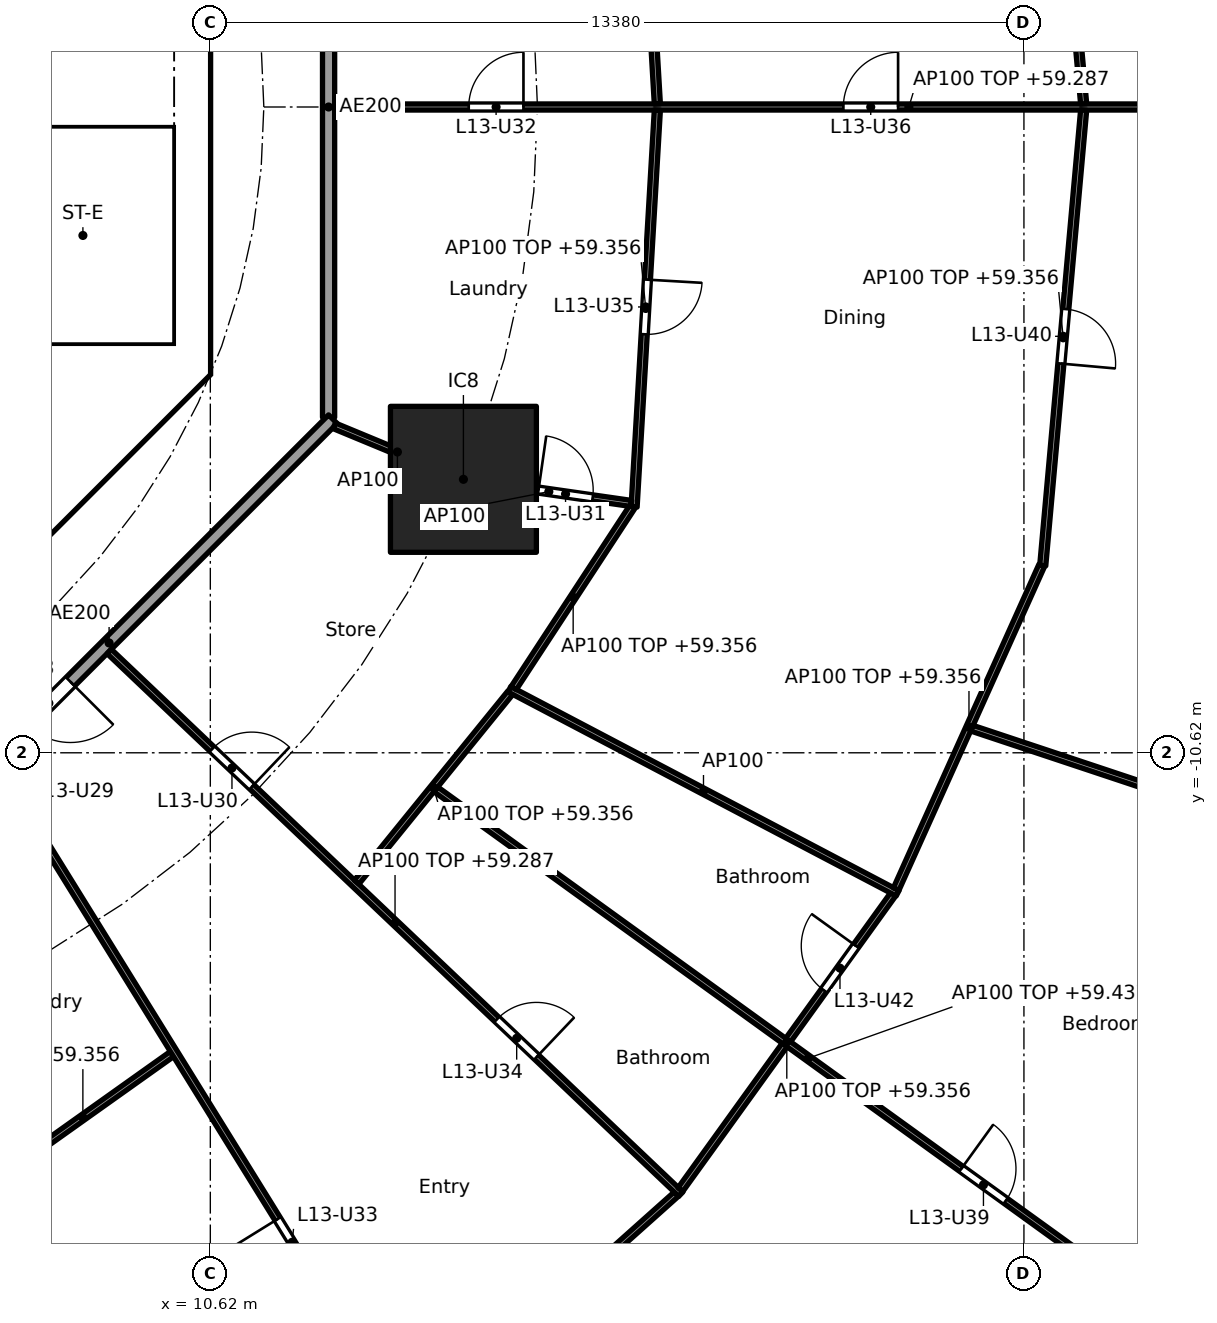
"""IFC4 building model, lengths in metres.
Left out: names, types, materials, properties, quantities, classifications, styles, units other than length and angle.
Written with IfcOpenShell. Run it as: python <this file> out.ifc"""

import sys

from ifc_helpers import new_model, si_unit, direction, frame, frame_2d, origin, origin_2d, place, context, subcontext, project, spatial, polyline, rectangle, outline, extrude, element, fill, save


model = new_model("IFC4")
c1 = context("Model", 3, precision=1e-05, world=origin(), true_north=direction((0.0, 1.0)))
c2 = subcontext(c1, "Body", "Model", "MODEL_VIEW")
j1 = project(units=[si_unit("LENGTHUNIT", "METRE"), si_unit("PLANEANGLEUNIT", "RADIAN")], contexts=[c1])
p1 = place(None, origin())
s1 = spatial("IfcSite", under=j1, at=p1, CompositionType="ELEMENT")
p2 = place(p1, origin())
s2 = spatial("IfcBuilding", under=s1, at=p2, CompositionType="ELEMENT")
p3 = place(p2, frame((0.0, 0.0, 56.6)))
s3 = spatial("IfcBuildingStorey", under=s2, at=p3, CompositionType="ELEMENT", Elevation=56.6)
p4 = place(p3, frame((14.782, -6.123, 0.0), z_axis=(0.0, 0.0, 1.0), x_axis=(1.0, 0.0, 0.0)))
e1 = element("IfcColumn", 1, at=p4, inside=s3, PredefinedType="COLUMN", context=c2, shape_type="SweptSolid", body=[
    extrude(rectangle(XDim=2.4, YDim=2.4, at=origin_2d()), origin(), (0.0, 0.0, 1.0), 3.7),
])
p5 = place(p3, frame((4.613, -9.988, 0.0), z_axis=(0.0, 0.0, 1.0), x_axis=(0.707106781187, 0.707106781187, 0.0)))
e2 = element("IfcWall", 2, at=p5, inside=s3, PredefinedType="SHEAR", context=c2, shape_type="SweptSolid", body=[
    extrude(rectangle(XDim=7.602, YDim=0.6, at=frame_2d((3.801, 0.0))), origin(), (0.0, 0.0, 1.0), 3.44),
])
p6 = place(p5, frame((3.201, 0.0, 0.0)))
e3 = element("IfcOpeningElement", 3, at=p6, cuts=e2, PredefinedType="OPENING", context=c2, shape_type="SweptSolid", body=[
    extrude(rectangle(XDim=1.2, YDim=2.1, at=frame_2d((0.6, 1.05))), frame((0.0, 0.31, 0.0), z_axis=(0.0, -1.0, 0.0), x_axis=(1.0, 0.0, 0.0)), (0.0, 0.0, 1.0), 0.62),
])
p7 = place(p3, origin())
e4 = element("IfcWall", 4, at=p7, inside=s3, PredefinedType="SHEAR", context=c2, shape_type="SweptSolid", body=[
    extrude(outline(polyline([(9.776, -4.401), (10.025, -4.152), (10.025, -3.801), (10.025, 4.152), (9.776, 4.401), (10.2, 4.825), (10.625, 4.401), (10.625, -4.401), (10.2, -4.825), (9.776, -4.401)])), origin(), (0.0, 0.0, 1.0), 3.44),
])
p8 = place(p3, origin())
e5 = element("IfcWall", 5, at=p8, inside=s3, PredefinedType="SOLIDWALL", context=c2, shape_type="SweptSolid", body=[
    extrude(outline(polyline([(10.025, -4.1), (6.7, -4.1), (6.7, -3.9), (10.025, -3.9), (10.025, -4.1)])), origin(), (0.0, 0.0, 1.0), 3.44),
])
p9 = place(p3, frame((6.137, -14.83, 0.0), z_axis=(0.0, 0.0, 1.0), x_axis=(0.27985745069, -0.960041565399, 0.0)))
e6 = element("IfcWall", 6, at=p9, inside=s3, PredefinedType="PARTITIONING", context=c2, shape_type="SweptSolid", body=[
    extrude(rectangle(XDim=16.705, YDim=0.2, at=frame_2d((8.353, 0.0))), origin(), (0.0, 0.0, 1.0), 2.756),
])
p10 = place(p3, frame((12.565, -5.104, 0.0), z_axis=(0.0, 0.0, 1.0), x_axis=(0.0, 1.0, 0.0)))
e7 = element("IfcWall", 7, at=p10, inside=s3, PredefinedType="PARTITIONING", context=c2, shape_type="SweptSolid", body=[
    extrude(rectangle(XDim=10.209, YDim=0.2, at=frame_2d((5.104, 0.0))), origin(), (0.0, 0.0, 1.0), 3.44),
])
p11 = place(p3, frame((5.275, -12.494, 0.0), z_axis=(0.0, 0.0, 1.0), x_axis=(0.707106781187, 0.707106781187, 0.0)))
e8 = element("IfcWall", 8, at=p11, inside=s3, PredefinedType="PARTITIONING", context=c2, shape_type="SweptSolid", body=[
    extrude(rectangle(XDim=10.409, YDim=0.2, at=frame_2d((5.205, 0.0))), origin(), (0.0, 0.0, 1.0), 3.44),
])
p12 = place(p11, frame((3.303, 0.0, 0.0)))
e9 = element("IfcOpeningElement", 9, at=p12, cuts=e8, PredefinedType="OPENING", context=c2, shape_type="SweptSolid", body=[
    extrude(rectangle(XDim=1.0, YDim=2.1, at=frame_2d((0.5, 1.05))), frame((0.0, 0.11, 0.0), z_axis=(0.0, -1.0, 0.0), x_axis=(1.0, 0.0, 0.0)), (0.0, 0.0, 1.0), 0.22),
])
p13 = place(p3, frame((12.665, 0.0, 0.0), z_axis=(0.0, 0.0, 1.0), x_axis=(1.0, 0.0, 0.0)))
e10 = element("IfcWall", 10, at=p13, inside=s3, PredefinedType="PARTITIONING", context=c2, shape_type="SweptSolid", body=[
    extrude(rectangle(XDim=18.885, YDim=0.1, at=frame_2d((9.443, 0.0))), origin(), (0.0, 0.0, 1.0), 2.687),
])
p14 = place(p13, frame((2.205, 0.0, 0.0)))
e11 = element("IfcOpeningElement", 11, at=p14, cuts=e10, PredefinedType="OPENING", context=c2, shape_type="SweptSolid", body=[
    extrude(rectangle(XDim=0.9, YDim=2.1, at=frame_2d((0.45, 1.05))), frame((0.0, 0.06, 0.0), z_axis=(0.0, -1.0, 0.0), x_axis=(1.0, 0.0, 0.0)), (0.0, 0.0, 1.0), 0.12),
])
p15 = place(p13, frame((8.366, 0.0, 0.0)))
e12 = element("IfcOpeningElement", 12, at=p15, cuts=e10, PredefinedType="OPENING", context=c2, shape_type="SweptSolid", body=[
    extrude(rectangle(XDim=0.9, YDim=2.1, at=frame_2d((0.45, 1.05))), frame((0.0, 0.06, 0.0), z_axis=(0.0, -1.0, 0.0), x_axis=(1.0, 0.0, 0.0)), (0.0, 0.0, 1.0), 0.12),
])
p16 = place(p13, frame((15.154, 0.0, 0.0)))
e13 = element("IfcOpeningElement", 13, at=p16, cuts=e10, PredefinedType="OPENING", context=c2, shape_type="SweptSolid", body=[
    extrude(rectangle(XDim=0.9, YDim=2.1, at=frame_2d((0.45, 1.05))), frame((0.0, 0.06, 0.0), z_axis=(0.0, -1.0, 0.0), x_axis=(1.0, 0.0, 0.0)), (0.0, 0.0, 1.0), 0.12),
])
p17 = place(p3, frame((17.971, 0.05, 0.0), z_axis=(0.0, 0.0, 1.0), x_axis=(-0.058513659907, 0.998286607946, 0.0)))
e14 = element("IfcWall", 14, at=p17, inside=s3, PredefinedType="PARTITIONING", context=c2, shape_type="SweptSolid", body=[
    extrude(rectangle(XDim=6.388, YDim=0.1, at=frame_2d((3.194, 0.0))), origin(), (0.0, 0.0, 1.0), 2.756),
])
p18 = place(p3, frame((17.971, -0.05, 0.0), z_axis=(0.0, 0.0, 1.0), x_axis=(-0.058476853647, -0.998288764631, 0.0)))
e15 = element("IfcWall", 15, at=p18, inside=s3, PredefinedType="PARTITIONING", context=c2, shape_type="SweptSolid", body=[
    extrude(rectangle(XDim=6.538, YDim=0.1, at=frame_2d((3.269, 0.0))), origin(), (0.0, 0.0, 1.0), 2.756),
])
p19 = place(p18, frame((2.794, 0.0, 0.0)))
e16 = element("IfcOpeningElement", 16, at=p19, cuts=e15, PredefinedType="OPENING", context=c2, shape_type="SweptSolid", body=[
    extrude(rectangle(XDim=0.9, YDim=2.1, at=frame_2d((0.45, 1.05))), frame((0.0, 0.06, 0.0), z_axis=(0.0, -1.0, 0.0), x_axis=(1.0, 0.0, 0.0)), (0.0, 0.0, 1.0), 0.12),
])
p20 = place(p3, frame((24.982, 0.05, 0.0), z_axis=(0.0, 0.0, 1.0), x_axis=(-0.08944290521, 0.995991951126, 0.0)))
e17 = element("IfcWall", 17, at=p20, inside=s3, PredefinedType="PARTITIONING", context=c2, shape_type="SweptSolid", body=[
    extrude(rectangle(XDim=7.373, YDim=0.1, at=frame_2d((3.686, 0.0))), origin(), (0.0, 0.0, 1.0), 2.756),
])
p21 = place(p3, frame((24.982, -0.05, 0.0), z_axis=(0.0, 0.0, 1.0), x_axis=(-0.089444214321, -0.995991833563, 0.0)))
e18 = element("IfcWall", 18, at=p21, inside=s3, PredefinedType="PARTITIONING", context=c2, shape_type="SweptSolid", body=[
    extrude(rectangle(XDim=7.523, YDim=0.1, at=frame_2d((3.761, 0.0))), origin(), (0.0, 0.0, 1.0), 2.756),
])
p22 = place(p21, frame((3.286, 0.0, 0.0)))
e19 = element("IfcOpeningElement", 19, at=p22, cuts=e18, PredefinedType="OPENING", context=c2, shape_type="SweptSolid", body=[
    extrude(rectangle(XDim=0.9, YDim=2.1, at=frame_2d((0.45, 1.05))), frame((0.0, 0.06, 0.0), z_axis=(0.0, -1.0, 0.0), x_axis=(1.0, 0.0, 0.0)), (0.0, 0.0, 1.0), 0.12),
])
p23 = place(p3, frame((7.06, -17.657, 0.0), z_axis=(0.0, 0.0, 1.0), x_axis=(0.81492039338, 0.57957290521, 0.0)))
e20 = element("IfcWall", 20, at=p23, inside=s3, PredefinedType="PARTITIONING", context=c2, shape_type="SweptSolid", body=[
    extrude(rectangle(XDim=3.594, YDim=0.1, at=frame_2d((1.797, 0.0))), origin(), (0.0, 0.0, 1.0), 2.756),
])
p24 = place(p3, frame((7.097, -10.81, 0.0), z_axis=(0.0, 0.0, 1.0), x_axis=(0.526453266471, -0.850204068576, 0.0)))
e21 = element("IfcWall", 21, at=p24, inside=s3, PredefinedType="PARTITIONING", context=c2, shape_type="SweptSolid", body=[
    extrude(rectangle(XDim=19.85, YDim=0.1, at=frame_2d((9.925, 0.0))), origin(), (0.0, 0.0, 1.0), 2.687),
])
p25 = place(p24, frame((0.35, 0.0, 0.0)))
e22 = element("IfcOpeningElement", 22, at=p25, cuts=e21, PredefinedType="OPENING", context=c2, shape_type="SweptSolid", body=[
    extrude(rectangle(XDim=0.9, YDim=2.1, at=frame_2d((0.45, 1.05))), frame((0.0, 0.06, 0.0), z_axis=(0.0, -1.0, 0.0), x_axis=(1.0, 0.0, 0.0)), (0.0, 0.0, 1.0), 0.12),
])
p26 = place(p24, frame((8.795, 0.0, 0.0)))
e23 = element("IfcOpeningElement", 23, at=p26, cuts=e21, PredefinedType="OPENING", context=c2, shape_type="SweptSolid", body=[
    extrude(rectangle(XDim=0.9, YDim=2.1, at=frame_2d((0.45, 1.05))), frame((0.0, 0.06, 0.0), z_axis=(0.0, -1.0, 0.0), x_axis=(1.0, 0.0, 0.0)), (0.0, 0.0, 1.0), 0.12),
])
p27 = place(p3, frame((13.936, -21.761, 0.0), z_axis=(0.0, 0.0, 1.0), x_axis=(0.745806142791, 0.666163041136, 0.0)))
e24 = element("IfcWall", 24, at=p27, inside=s3, PredefinedType="PARTITIONING", context=c2, shape_type="SweptSolid", body=[
    extrude(rectangle(XDim=5.831, YDim=0.1, at=frame_2d((2.915, 0.0))), origin(), (0.0, 0.0, 1.0), 2.756),
])
p28 = place(p27, frame((2.465, 0.0, 0.0)))
e25 = element("IfcOpeningElement", 25, at=p28, cuts=e24, PredefinedType="OPENING", context=c2, shape_type="SweptSolid", body=[
    extrude(rectangle(XDim=0.9, YDim=2.1, at=frame_2d((0.45, 1.05))), frame((0.0, 0.06, 0.0), z_axis=(0.0, -1.0, 0.0), x_axis=(1.0, 0.0, 0.0)), (0.0, 0.0, 1.0), 0.12),
])
p29 = place(p3, frame((8.957, -8.953, 0.0), z_axis=(0.0, 0.0, 1.0), x_axis=(0.725250022034, -0.688485588476, 0.0)))
e26 = element("IfcWall", 26, at=p29, inside=s3, PredefinedType="PARTITIONING", context=c2, shape_type="SweptSolid", body=[
    extrude(rectangle(XDim=12.963, YDim=0.1, at=frame_2d((6.481, 0.0))), origin(), (0.0, 0.0, 1.0), 2.687),
])
p30 = place(p29, frame((2.333, 0.0, 0.0)))
e27 = element("IfcOpeningElement", 27, at=p30, cuts=e26, PredefinedType="OPENING", context=c2, shape_type="SweptSolid", body=[
    extrude(rectangle(XDim=0.9, YDim=2.1, at=frame_2d((0.45, 1.05))), frame((0.0, 0.06, 0.0), z_axis=(0.0, -1.0, 0.0), x_axis=(1.0, 0.0, 0.0)), (0.0, 0.0, 1.0), 0.12),
])
p31 = place(p29, frame((8.79, 0.0, 0.0)))
e28 = element("IfcOpeningElement", 28, at=p31, cuts=e26, PredefinedType="OPENING", context=c2, shape_type="SweptSolid", body=[
    extrude(rectangle(XDim=0.9, YDim=2.1, at=frame_2d((0.45, 1.05))), frame((0.0, 0.06, 0.0), z_axis=(0.0, -1.0, 0.0), x_axis=(1.0, 0.0, 0.0)), (0.0, 0.0, 1.0), 0.12),
])
p32 = place(p3, frame((13.026, -12.747, 0.0), z_axis=(0.0, 0.0, 1.0), x_axis=(0.630126826288, 0.776492229705, 0.0)))
e29 = element("IfcWall", 29, at=p32, inside=s3, PredefinedType="PARTITIONING", context=c2, shape_type="SweptSolid", body=[
    extrude(rectangle(XDim=4.007, YDim=0.1, at=frame_2d((2.003, 0.0))), origin(), (0.0, 0.0, 1.0), 2.756),
])
p33 = place(p3, frame((18.351, -17.803, 0.0), z_axis=(0.0, 0.0, 1.0), x_axis=(0.584563700282, 0.811347817099, 0.0)))
e30 = element("IfcWall", 30, at=p33, inside=s3, PredefinedType="PARTITIONING", context=c2, shape_type="SweptSolid", body=[
    extrude(rectangle(XDim=5.984, YDim=0.1, at=frame_2d((2.992, 0.0))), origin(), (0.0, 0.0, 1.0), 2.756),
])
p34 = place(p33, frame((4.038, 0.0, 0.0)))
e31 = element("IfcOpeningElement", 31, at=p34, cuts=e30, PredefinedType="OPENING", context=c2, shape_type="SweptSolid", body=[
    extrude(rectangle(XDim=0.9, YDim=2.1, at=frame_2d((0.45, 1.05))), frame((0.0, 0.06, 0.0), z_axis=(0.0, -1.0, 0.0), x_axis=(1.0, 0.0, 0.0)), (0.0, 0.0, 1.0), 0.12),
])
p35 = place(p3, frame((14.329, -11.221, 0.0), z_axis=(0.0, 0.0, 1.0), x_axis=(0.810671130917, -0.58550176558, 0.0)))
e32 = element("IfcWall", 32, at=p35, inside=s3, PredefinedType="PARTITIONING", context=c2, shape_type="SweptSolid", body=[
    extrude(rectangle(XDim=15.106, YDim=0.1, at=frame_2d((7.553, 0.0))), origin(), (0.0, 0.0, 1.0), 2.837),
])
p36 = place(p35, frame((10.659, 0.0, 0.0)))
e33 = element("IfcOpeningElement", 33, at=p36, cuts=e32, PredefinedType="OPENING", context=c2, shape_type="SweptSolid", body=[
    extrude(rectangle(XDim=0.9, YDim=2.1, at=frame_2d((0.45, 1.05))), frame((0.0, 0.06, 0.0), z_axis=(0.0, -1.0, 0.0), x_axis=(1.0, 0.0, 0.0)), (0.0, 0.0, 1.0), 0.12),
])
p37 = place(p3, frame((15.538, -9.574, 0.0), z_axis=(0.0, 0.0, 1.0), x_axis=(0.88517945493, -0.465249752895, 0.0)))
e34 = element("IfcWall", 34, at=p37, inside=s3, PredefinedType="PARTITIONING", context=c2, shape_type="SweptSolid", body=[
    extrude(rectangle(XDim=7.213, YDim=0.1, at=frame_2d((3.606, 0.0))), origin(), (0.0, 0.0, 1.0), 3.44),
])
p38 = place(p3, frame((15.609, -9.556, 0.0), z_axis=(0.0, 0.0, 1.0), x_axis=(0.547641765292, 0.836712911881, 0.0)))
e35 = element("IfcWall", 35, at=p38, inside=s3, PredefinedType="PARTITIONING", context=c2, shape_type="SweptSolid", body=[
    extrude(rectangle(XDim=3.57, YDim=0.1, at=frame_2d((1.785, 0.0))), origin(), (0.0, 0.0, 1.0), 2.756),
])
p39 = place(p3, frame((21.899, -12.861, 0.0), z_axis=(0.0, 0.0, 1.0), x_axis=(0.410197710154, 0.911996622025, 0.0)))
e36 = element("IfcWall", 36, at=p39, inside=s3, PredefinedType="PARTITIONING", context=c2, shape_type="SweptSolid", body=[
    extrude(rectangle(XDim=5.837, YDim=0.1, at=frame_2d((2.918, 0.0))), origin(), (0.0, 0.0, 1.0), 2.756),
])
p40 = place(p3, frame((23.144, -10.216, 0.0), z_axis=(0.0, 0.0, 1.0), x_axis=(0.948811715359, -0.315842253027, 0.0)))
e37 = element("IfcWall", 37, at=p40, inside=s3, PredefinedType="PARTITIONING", context=c2, shape_type="SweptSolid", body=[
    extrude(rectangle(XDim=7.6, YDim=0.1, at=frame_2d((3.8, 0.0))), origin(), (0.0, 0.0, 1.0), 2.837),
])
p41 = place(p3, frame((12.657, -5.243, 0.0), z_axis=(0.0, 0.0, 1.0), x_axis=(0.923864733477, -0.382719158442, 0.0)))
e38 = element("IfcWall", 38, at=p41, inside=s3, PredefinedType="PARTITIONING", context=c2, shape_type="SweptSolid", body=[
    extrude(rectangle(XDim=2.25, YDim=0.1, at=frame_2d((1.125, 0.0))), origin(), (0.0, 0.0, 1.0), 3.44),
])
p42 = place(p3, frame((14.832, -6.13, 0.0), z_axis=(0.0, 0.0, 1.0), x_axis=(0.989840446863, -0.142182593007, 0.0)))
e39 = element("IfcWall", 39, at=p42, inside=s3, PredefinedType="PARTITIONING", context=c2, shape_type="SweptSolid", body=[
    extrude(rectangle(XDim=2.739, YDim=0.1, at=frame_2d((1.369, 0.0))), origin(), (0.0, 0.0, 1.0), 3.44),
])
p43 = place(p42, frame((1.197, 0.0, 0.0)))
e40 = element("IfcOpeningElement", 40, at=p43, cuts=e39, PredefinedType="OPENING", context=c2, shape_type="SweptSolid", body=[
    extrude(rectangle(XDim=0.9, YDim=2.1, at=frame_2d((0.45, 1.05))), frame((0.0, 0.06, 0.0), z_axis=(0.0, -1.0, 0.0), x_axis=(1.0, 0.0, 0.0)), (0.0, 0.0, 1.0), 0.12),
])
p44 = place(p12, frame((1.0, 0.0, 0.0), x_axis=(-1.0, 0.0, 0.0)))
e41 = element("IfcDoor", 41, at=p44, inside=s3, OperationType="SINGLE_SWING_LEFT", PredefinedType="DOOR", context=c2, shape_type="SweptSolid", body=[
    extrude(rectangle(XDim=1.0, YDim=2.1, at=frame_2d((0.5, 1.05))), frame((0.0, 0.025, 0.0), z_axis=(0.0, -1.0, 0.0), x_axis=(1.0, 0.0, 0.0)), (0.0, 0.0, 1.0), 0.05),
])
fill(e9, e41)
p45 = place(p30, origin())
e42 = element("IfcDoor", 42, at=p45, inside=s3, OperationType="SINGLE_SWING_RIGHT", PredefinedType="DOOR", context=c2, shape_type="SweptSolid", body=[
    extrude(rectangle(XDim=0.9, YDim=2.1, at=frame_2d((0.45, 1.05))), frame((0.0, 0.025, 0.0), z_axis=(0.0, -1.0, 0.0), x_axis=(1.0, 0.0, 0.0)), (0.0, 0.0, 1.0), 0.05),
])
fill(e27, e42)
p46 = place(p43, origin())
e43 = element("IfcDoor", 43, at=p46, inside=s3, OperationType="SINGLE_SWING_LEFT", PredefinedType="DOOR", context=c2, shape_type="SweptSolid", body=[
    extrude(rectangle(XDim=0.9, YDim=2.1, at=frame_2d((0.45, 1.05))), frame((0.0, 0.025, 0.0), z_axis=(0.0, -1.0, 0.0), x_axis=(1.0, 0.0, 0.0)), (0.0, 0.0, 1.0), 0.05),
])
fill(e40, e43)
p47 = place(p14, origin())
e44 = element("IfcDoor", 44, at=p47, inside=s3, OperationType="SINGLE_SWING_RIGHT", PredefinedType="DOOR", context=c2, shape_type="SweptSolid", body=[
    extrude(rectangle(XDim=0.9, YDim=2.1, at=frame_2d((0.45, 1.05))), frame((0.0, 0.025, 0.0), z_axis=(0.0, -1.0, 0.0), x_axis=(1.0, 0.0, 0.0)), (0.0, 0.0, 1.0), 0.05),
])
fill(e11, e44)
p48 = place(p26, frame((0.9, 0.0, 0.0), x_axis=(-1.0, 0.0, 0.0)))
e45 = element("IfcDoor", 45, at=p48, inside=s3, OperationType="SINGLE_SWING_RIGHT", PredefinedType="DOOR", context=c2, shape_type="SweptSolid", body=[
    extrude(rectangle(XDim=0.9, YDim=2.1, at=frame_2d((0.45, 1.05))), frame((0.0, 0.025, 0.0), z_axis=(0.0, -1.0, 0.0), x_axis=(1.0, 0.0, 0.0)), (0.0, 0.0, 1.0), 0.05),
])
fill(e23, e45)
p49 = place(p31, origin())
e46 = element("IfcDoor", 46, at=p49, inside=s3, OperationType="SINGLE_SWING_RIGHT", PredefinedType="DOOR", context=c2, shape_type="SweptSolid", body=[
    extrude(rectangle(XDim=0.9, YDim=2.1, at=frame_2d((0.45, 1.05))), frame((0.0, 0.025, 0.0), z_axis=(0.0, -1.0, 0.0), x_axis=(1.0, 0.0, 0.0)), (0.0, 0.0, 1.0), 0.05),
])
fill(e28, e46)
p50 = place(p19, origin())
e47 = element("IfcDoor", 47, at=p50, inside=s3, OperationType="SINGLE_SWING_LEFT", PredefinedType="DOOR", context=c2, shape_type="SweptSolid", body=[
    extrude(rectangle(XDim=0.9, YDim=2.1, at=frame_2d((0.45, 1.05))), frame((0.0, 0.025, 0.0), z_axis=(0.0, -1.0, 0.0), x_axis=(1.0, 0.0, 0.0)), (0.0, 0.0, 1.0), 0.05),
])
fill(e16, e47)
p51 = place(p15, origin())
e48 = element("IfcDoor", 48, at=p51, inside=s3, OperationType="SINGLE_SWING_RIGHT", PredefinedType="DOOR", context=c2, shape_type="SweptSolid", body=[
    extrude(rectangle(XDim=0.9, YDim=2.1, at=frame_2d((0.45, 1.05))), frame((0.0, 0.025, 0.0), z_axis=(0.0, -1.0, 0.0), x_axis=(1.0, 0.0, 0.0)), (0.0, 0.0, 1.0), 0.05),
])
fill(e12, e48)
p52 = place(p36, origin())
e49 = element("IfcDoor", 49, at=p52, inside=s3, OperationType="SINGLE_SWING_LEFT", PredefinedType="DOOR", context=c2, shape_type="SweptSolid", body=[
    extrude(rectangle(XDim=0.9, YDim=2.1, at=frame_2d((0.45, 1.05))), frame((0.0, 0.025, 0.0), z_axis=(0.0, -1.0, 0.0), x_axis=(1.0, 0.0, 0.0)), (0.0, 0.0, 1.0), 0.05),
])
fill(e33, e49)
p53 = place(p22, origin())
e50 = element("IfcDoor", 50, at=p53, inside=s3, OperationType="SINGLE_SWING_RIGHT", PredefinedType="DOOR", context=c2, shape_type="SweptSolid", body=[
    extrude(rectangle(XDim=0.9, YDim=2.1, at=frame_2d((0.45, 1.05))), frame((0.0, 0.025, 0.0), z_axis=(0.0, -1.0, 0.0), x_axis=(1.0, 0.0, 0.0)), (0.0, 0.0, 1.0), 0.05),
])
fill(e19, e50)
p54 = place(p34, origin())
e51 = element("IfcDoor", 51, at=p54, inside=s3, OperationType="SINGLE_SWING_RIGHT", PredefinedType="DOOR", context=c2, shape_type="SweptSolid", body=[
    extrude(rectangle(XDim=0.9, YDim=2.1, at=frame_2d((0.45, 1.05))), frame((0.0, 0.025, 0.0), z_axis=(0.0, -1.0, 0.0), x_axis=(1.0, 0.0, 0.0)), (0.0, 0.0, 1.0), 0.05),
])
fill(e31, e51)
save(model, sys.argv[1])
